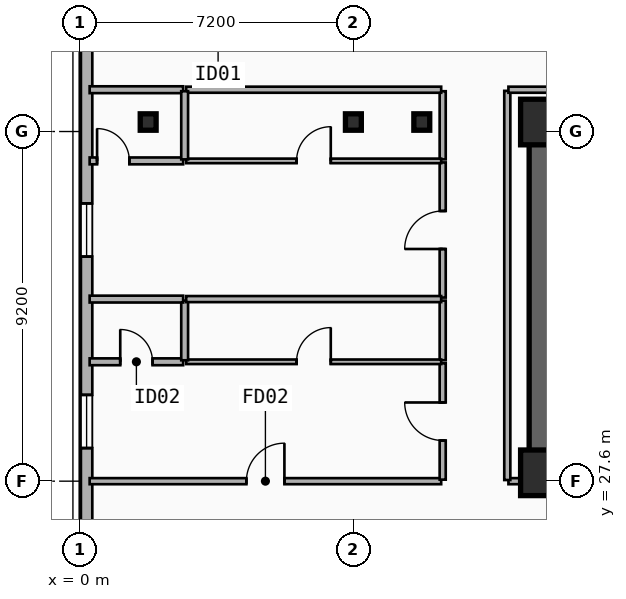
"""IFC4 building model, lengths in metres.
Left out: names, types, materials, properties, quantities, classifications, styles, units other than length and angle.
Written with IfcOpenShell. Run it as: python <this file> out.ifc"""

import sys

from ifc_helpers import new_model, si_unit, direction, frame, frame_2d, origin, origin_2d, place, context, subcontext, project, spatial, rectangle, i_section, extrude, element, fill, save


model = new_model("IFC4")
c1 = context("Model", 3, precision=1e-05, world=origin(), true_north=direction((0.0, 1.0)))
c2 = subcontext(c1, "Body", "Model", "MODEL_VIEW")
j1 = project(units=[si_unit("LENGTHUNIT", "METRE"), si_unit("PLANEANGLEUNIT", "RADIAN")], contexts=[c1])
p1 = place(None, origin())
s1 = spatial("IfcSite", under=j1, at=p1, CompositionType="ELEMENT")
p2 = place(p1, origin())
s2 = spatial("IfcBuilding", under=s1, at=p2, CompositionType="ELEMENT")
p3 = place(p2, frame((0.0, 0.0, 97.8)))
s3 = spatial("IfcBuildingStorey", under=s2, at=p3, CompositionType="ELEMENT", Elevation=97.8)
p4 = place(p3, frame((12.15, 37.05, 0.0), z_axis=(0.0, 0.0, 1.0), x_axis=(1.0, 0.0, 0.0)))
e1 = element("IfcWall", 1, at=p4, inside=s3, PredefinedType="SHEAR", context=c2, shape_type="SweptSolid", body=[
    extrude(rectangle(XDim=33.23, YDim=0.65, at=frame_2d((16.615, 0.0))), origin(), (0.0, 0.0, 1.0), 3.5),
])
p5 = place(p3, frame((21.18, 27.82, 0.0), z_axis=(0.0, 0.0, 1.0), x_axis=(-1.0, 0.0, 0.0)))
e2 = element("IfcWall", 2, at=p5, inside=s3, PredefinedType="SHEAR", context=c2, shape_type="SweptSolid", body=[
    extrude(rectangle(XDim=9.03, YDim=0.65, at=frame_2d((4.515, 0.0))), origin(), (0.0, 0.0, 1.0), 3.5),
])
p6 = place(p5, frame((2.68, 0.0, 0.0)))
e3 = element("IfcOpeningElement", 3, at=p6, cuts=e2, PredefinedType="OPENING", context=c2, shape_type="SweptSolid", body=[
    extrude(rectangle(XDim=1.1, YDim=2.15, at=frame_2d((0.55, 1.075))), frame((0.0, 0.335, 0.0), z_axis=(0.0, -1.0, 0.0), x_axis=(1.0, 0.0, 0.0)), (0.0, 0.0, 1.0), 0.67),
])
p7 = place(p3, frame((12.15, 28.145, 0.0), z_axis=(0.0, 0.0, 1.0), x_axis=(0.0, 1.0, 0.0)))
e4 = element("IfcWall", 4, at=p7, inside=s3, PredefinedType="SHEAR", context=c2, shape_type="SweptSolid", body=[
    extrude(rectangle(XDim=8.58, YDim=0.65, at=frame_2d((4.29, 0.0))), origin(), (0.0, 0.0, 1.0), 3.5),
])
for number, where, z_axis, x_axis in (
    (5, (12.2, 27.82, 0.0), (0.0, 0.0, 1.0), (1.0, 0.0, 0.0)),
    (6, (12.2, 37.05, 0.0), (0.0, 0.0, 1.0), (1.0, 0.0, 0.0)),
):
    element("IfcColumn", number, at=place(p3, frame(where, z_axis=z_axis, x_axis=x_axis)), inside=s3, PredefinedType="COLUMN", context=c2, shape_type="SweptSolid", body=[
        extrude(rectangle(XDim=1.2, YDim=1.2, at=origin_2d()), origin(), (0.0, 0.0, 1.0), 3.5),
    ])
for number, where, z_axis, x_axis in (
    (7, (9.0, 37.05, 0.0), (0.0, 0.0, 1.0), (1.0, 0.0, 0.0)),
    (8, (1.8, 37.05, 0.0), (0.0, 0.0, 1.0), (1.0, 0.0, 0.0)),
    (9, (7.2, 37.05, 0.0), (0.0, 0.0, 1.0), (1.0, 0.0, 0.0)),
):
    element("IfcColumn", number, at=place(p3, frame(where, z_axis=z_axis, x_axis=x_axis)), inside=s3, PredefinedType="COLUMN", context=c2, shape_type="SweptSolid", body=[
        extrude(i_section(OverallWidth=0.418, OverallDepth=0.432, WebThickness=0.035, FlangeThickness=0.056, FilletRadius=0.015, at=origin_2d()), origin(), (0.0, 0.0, 1.0), 3.5),
    ])
p8 = place(p3, frame((0.18, 21.0, 0.0), z_axis=(0.0, 0.0, 1.0), x_axis=(0.0, 1.0, 0.0)))
e10 = element("IfcWall", 10, at=p8, inside=s3, PredefinedType="SOLIDWALL", context=c2, shape_type="SweptSolid", body=[
    extrude(rectangle(XDim=18.0, YDim=0.3, at=frame_2d((9.0, 0.0))), origin(), (0.0, 0.0, 1.0), 3.24),
])
p9 = place(p8, frame((7.47, 0.0, 0.48)))
e11 = element("IfcOpeningElement", 11, at=p9, cuts=e10, PredefinedType="OPENING", context=c2, shape_type="SweptSolid", body=[
    extrude(rectangle(XDim=1.4, YDim=1.8, at=frame_2d((0.7, 0.9))), frame((0.0, 0.16, 0.0), z_axis=(0.0, -1.0, 0.0), x_axis=(1.0, 0.0, 0.0)), (0.0, 0.0, 1.0), 0.32),
])
p10 = place(p8, frame((12.509, 0.0, 0.48)))
e12 = element("IfcOpeningElement", 12, at=p10, cuts=e10, PredefinedType="OPENING", context=c2, shape_type="SweptSolid", body=[
    extrude(rectangle(XDim=1.4, YDim=1.8, at=frame_2d((0.7, 0.9))), frame((0.0, 0.16, 0.0), z_axis=(0.0, -1.0, 0.0), x_axis=(1.0, 0.0, 0.0)), (0.0, 0.0, 1.0), 0.32),
])
p11 = place(p8, frame((0.32, 0.0, 0.65)))
e13 = element("IfcOpeningElement", 13, at=p11, cuts=e10, PredefinedType="OPENING", context=c2, shape_type="SweptSolid", body=[
    extrude(rectangle(XDim=1.4, YDim=1.8, at=frame_2d((0.7, 0.9))), frame((0.0, 0.16, 0.0), z_axis=(0.0, -1.0, 0.0), x_axis=(1.0, 0.0, 0.0)), (0.0, 0.0, 1.0), 0.32),
])
p12 = place(p3, frame((0.26, 27.6, 0.0), z_axis=(0.0, 0.0, 1.0), x_axis=(1.0, 0.0, 0.0)))
e14 = element("IfcWall", 14, at=p12, inside=s3, PredefinedType="PARTITIONING", context=c2, shape_type="SweptSolid", body=[
    extrude(rectangle(XDim=9.25, YDim=0.16, at=frame_2d((4.625, 0.0))), origin(), (0.0, 0.0, 1.0), 2.57),
])
p13 = place(p12, frame((4.125, 0.0, 0.0)))
e15 = element("IfcOpeningElement", 15, at=p13, cuts=e14, PredefinedType="OPENING", context=c2, shape_type="SweptSolid", body=[
    extrude(rectangle(XDim=1.0, YDim=2.15, at=frame_2d((0.5, 1.075))), frame((0.0, 0.09, 0.0), z_axis=(0.0, -1.0, 0.0), x_axis=(1.0, 0.0, 0.0)), (0.0, 0.0, 1.0), 0.18),
])
p14 = place(p3, frame((9.55, 27.64, 0.0), z_axis=(0.0, 0.0, 1.0), x_axis=(0.0, 1.0, 0.0)))
e16 = element("IfcWall", 16, at=p14, inside=s3, PredefinedType="PARTITIONING", context=c2, shape_type="SweptSolid", body=[
    extrude(rectangle(XDim=3.061, YDim=0.16, at=frame_2d((1.531, 0.0))), origin(), (0.0, 0.0, 1.0), 3.24),
])
p15 = place(p14, frame((1.031, 0.0, 0.0)))
e17 = element("IfcOpeningElement", 17, at=p15, cuts=e16, PredefinedType="OPENING", context=c2, shape_type="SweptSolid", body=[
    extrude(rectangle(XDim=1.0, YDim=2.15, at=frame_2d((0.5, 1.075))), frame((0.0, 0.09, 0.0), z_axis=(0.0, -1.0, 0.0), x_axis=(1.0, 0.0, 0.0)), (0.0, 0.0, 1.0), 0.18),
])
p16 = place(p3, frame((9.55, 30.781, 0.0), z_axis=(0.0, 0.0, 1.0), x_axis=(0.0, 1.0, 0.0)))
e18 = element("IfcWall", 18, at=p16, inside=s3, PredefinedType="PARTITIONING", context=c2, shape_type="SweptSolid", body=[
    extrude(rectangle(XDim=1.57, YDim=0.16, at=frame_2d((0.785, 0.0))), origin(), (0.0, 0.0, 1.0), 3.24),
])
p17 = place(p3, frame((9.55, 32.431, 0.0), z_axis=(0.0, 0.0, 1.0), x_axis=(0.0, 1.0, 0.0)))
e19 = element("IfcWall", 19, at=p17, inside=s3, PredefinedType="PARTITIONING", context=c2, shape_type="SweptSolid", body=[
    extrude(rectangle(XDim=3.556, YDim=0.16, at=frame_2d((1.778, 0.0))), origin(), (0.0, 0.0, 1.0), 3.24),
])
p18 = place(p17, frame((1.278, 0.0, 0.0)))
e20 = element("IfcOpeningElement", 20, at=p18, cuts=e19, PredefinedType="OPENING", context=c2, shape_type="SweptSolid", body=[
    extrude(rectangle(XDim=1.0, YDim=2.15, at=frame_2d((0.5, 1.075))), frame((0.0, 0.09, 0.0), z_axis=(0.0, -1.0, 0.0), x_axis=(1.0, 0.0, 0.0)), (0.0, 0.0, 1.0), 0.18),
])
p19 = place(p3, frame((9.55, 36.067, 0.0), z_axis=(0.0, 0.0, 1.0), x_axis=(0.0, 1.0, 0.0)))
e21 = element("IfcWall", 21, at=p19, inside=s3, PredefinedType="PARTITIONING", context=c2, shape_type="SweptSolid", body=[
    extrude(rectangle(XDim=1.793, YDim=0.16, at=frame_2d((0.896, 0.0))), origin(), (0.0, 0.0, 1.0), 2.72),
])
p20 = place(p3, frame((0.26, 37.9, 0.0), z_axis=(0.0, 0.0, 1.0), x_axis=(1.0, 0.0, 0.0)))
e22 = element("IfcWall", 22, at=p20, inside=s3, PredefinedType="PLUMBINGWALL", context=c2, shape_type="SweptSolid", body=[
    extrude(rectangle(XDim=2.46, YDim=0.18, at=frame_2d((1.23, 0.0))), origin(), (0.0, 0.0, 1.0), 3.24),
])
p21 = place(p3, frame((2.8, 37.9, 0.0), z_axis=(0.0, 0.0, 1.0), x_axis=(1.0, 0.0, 0.0)))
e23 = element("IfcWall", 23, at=p21, inside=s3, PredefinedType="PARTITIONING", context=c2, shape_type="SweptSolid", body=[
    extrude(rectangle(XDim=6.71, YDim=0.16, at=frame_2d((3.355, 0.0))), origin(), (0.0, 0.0, 1.0), 3.24),
])
p22 = place(p3, frame((0.26, 30.741, 0.0), z_axis=(0.0, 0.0, 1.0), x_axis=(1.0, 0.0, 0.0)))
e24 = element("IfcWall", 24, at=p22, inside=s3, PredefinedType="PLUMBINGWALL", context=c2, shape_type="SweptSolid", body=[
    extrude(rectangle(XDim=2.46, YDim=0.18, at=frame_2d((1.23, 0.0))), origin(), (0.0, 0.0, 1.0), 2.57),
])
p23 = place(p22, frame((0.805, 0.0, 0.0)))
e25 = element("IfcOpeningElement", 25, at=p23, cuts=e24, PredefinedType="OPENING", context=c2, shape_type="SweptSolid", body=[
    extrude(rectangle(XDim=0.85, YDim=2.1, at=frame_2d((0.425, 1.05))), frame((0.0, 0.1, 0.0), z_axis=(0.0, -1.0, 0.0), x_axis=(1.0, 0.0, 0.0)), (0.0, 0.0, 1.0), 0.2),
])
p24 = place(p3, frame((2.8, 30.741, 0.0), z_axis=(0.0, 0.0, 1.0), x_axis=(1.0, 0.0, 0.0)))
e26 = element("IfcWall", 26, at=p24, inside=s3, PredefinedType="PARTITIONING", context=c2, shape_type="SweptSolid", body=[
    extrude(rectangle(XDim=6.71, YDim=0.12, at=frame_2d((3.355, 0.0))), origin(), (0.0, 0.0, 1.0), 2.57),
])
p25 = place(p24, frame((2.905, 0.0, 0.0)))
e27 = element("IfcOpeningElement", 27, at=p25, cuts=e26, PredefinedType="OPENING", context=c2, shape_type="SweptSolid", body=[
    extrude(rectangle(XDim=0.9, YDim=2.1, at=frame_2d((0.45, 1.05))), frame((0.0, 0.07, 0.0), z_axis=(0.0, -1.0, 0.0), x_axis=(1.0, 0.0, 0.0)), (0.0, 0.0, 1.0), 0.14),
])
p26 = place(p3, frame((2.76, 30.781, 0.0), z_axis=(0.0, 0.0, 1.0), x_axis=(0.0, 1.0, 0.0)))
e28 = element("IfcWall", 28, at=p26, inside=s3, PredefinedType="PLUMBINGWALL", context=c2, shape_type="SweptSolid", body=[
    extrude(rectangle(XDim=1.57, YDim=0.18, at=frame_2d((0.785, 0.0))), origin(), (0.0, 0.0, 1.0), 3.24),
])
p27 = place(p3, frame((0.26, 32.391, 0.0), z_axis=(0.0, 0.0, 1.0), x_axis=(1.0, 0.0, 0.0)))
e29 = element("IfcWall", 29, at=p27, inside=s3, PredefinedType="PLUMBINGWALL", context=c2, shape_type="SweptSolid", body=[
    extrude(rectangle(XDim=2.46, YDim=0.18, at=frame_2d((1.23, 0.0))), origin(), (0.0, 0.0, 1.0), 2.57),
])
p28 = place(p3, frame((2.8, 32.391, 0.0), z_axis=(0.0, 0.0, 1.0), x_axis=(1.0, 0.0, 0.0)))
e30 = element("IfcWall", 30, at=p28, inside=s3, PredefinedType="PARTITIONING", context=c2, shape_type="SweptSolid", body=[
    extrude(rectangle(XDim=6.71, YDim=0.16, at=frame_2d((3.355, 0.0))), origin(), (0.0, 0.0, 1.0), 2.57),
])
p29 = place(p3, frame((0.26, 36.027, 0.0), z_axis=(0.0, 0.0, 1.0), x_axis=(1.0, 0.0, 0.0)))
e31 = element("IfcWall", 31, at=p29, inside=s3, PredefinedType="PLUMBINGWALL", context=c2, shape_type="SweptSolid", body=[
    extrude(rectangle(XDim=2.46, YDim=0.18, at=frame_2d((1.23, 0.0))), origin(), (0.0, 0.0, 1.0), 2.57),
])
p30 = place(p29, frame((0.195, 0.0, 0.0)))
e32 = element("IfcOpeningElement", 32, at=p30, cuts=e31, PredefinedType="OPENING", context=c2, shape_type="SweptSolid", body=[
    extrude(rectangle(XDim=0.85, YDim=2.1, at=frame_2d((0.425, 1.05))), frame((0.0, 0.1, 0.0), z_axis=(0.0, -1.0, 0.0), x_axis=(1.0, 0.0, 0.0)), (0.0, 0.0, 1.0), 0.2),
])
p31 = place(p3, frame((2.8, 36.027, 0.0), z_axis=(0.0, 0.0, 1.0), x_axis=(1.0, 0.0, 0.0)))
e33 = element("IfcWall", 33, at=p31, inside=s3, PredefinedType="PARTITIONING", context=c2, shape_type="SweptSolid", body=[
    extrude(rectangle(XDim=6.71, YDim=0.12, at=frame_2d((3.355, 0.0))), origin(), (0.0, 0.0, 1.0), 2.57),
])
p32 = place(p31, frame((2.905, 0.0, 0.0)))
e34 = element("IfcOpeningElement", 34, at=p32, cuts=e33, PredefinedType="OPENING", context=c2, shape_type="SweptSolid", body=[
    extrude(rectangle(XDim=0.9, YDim=2.1, at=frame_2d((0.45, 1.05))), frame((0.0, 0.07, 0.0), z_axis=(0.0, -1.0, 0.0), x_axis=(1.0, 0.0, 0.0)), (0.0, 0.0, 1.0), 0.14),
])
p33 = place(p3, frame((2.76, 36.067, 0.0), z_axis=(0.0, 0.0, 1.0), x_axis=(0.0, 1.0, 0.0)))
e35 = element("IfcWall", 35, at=p33, inside=s3, PredefinedType="PLUMBINGWALL", context=c2, shape_type="SweptSolid", body=[
    extrude(rectangle(XDim=1.793, YDim=0.18, at=frame_2d((0.896, 0.0))), origin(), (0.0, 0.0, 1.0), 2.72),
])
p34 = place(p3, frame((11.28, 27.6, 0.0), z_axis=(0.0, 0.0, 1.0), x_axis=(1.0, 0.0, 0.0)))
e36 = element("IfcWall", 36, at=p34, inside=s3, PredefinedType="PARTITIONING", context=c2, shape_type="SweptSolid", body=[
    extrude(rectangle(XDim=0.84, YDim=0.16, at=frame_2d((0.42, 0.0))), origin(), (0.0, 0.0, 1.0), 2.28),
])
p35 = place(p3, frame((11.25, 27.63, 0.0), z_axis=(0.0, 0.0, 1.0), x_axis=(0.0, 1.0, 0.0)))
e37 = element("IfcWall", 37, at=p35, inside=s3, PredefinedType="PARTITIONING", context=c2, shape_type="SweptSolid", body=[
    extrude(rectangle(XDim=10.24, YDim=0.16, at=frame_2d((5.12, 0.0))), origin(), (0.0, 0.0, 1.0), 2.72),
])
p36 = place(p3, frame((11.28, 37.9, 0.0), z_axis=(0.0, 0.0, 1.0), x_axis=(1.0, 0.0, 0.0)))
e38 = element("IfcWall", 38, at=p36, inside=s3, PredefinedType="PARTITIONING", context=c2, shape_type="SweptSolid", body=[
    extrude(rectangle(XDim=35.04, YDim=0.16, at=frame_2d((17.52, 0.0))), origin(), (0.0, 0.0, 1.0), 3.24),
])
p37 = place(p9, origin())
e39 = element("IfcWindow", 39, at=p37, inside=s3, PartitioningType="SINGLE_PANEL", PredefinedType="WINDOW", context=c2, shape_type="SweptSolid", body=[
    extrude(rectangle(XDim=1.4, YDim=1.8, at=frame_2d((0.7, 0.9))), frame((0.0, 0.03, 0.0), z_axis=(0.0, -1.0, 0.0), x_axis=(1.0, 0.0, 0.0)), (0.0, 0.0, 1.0), 0.06),
])
fill(e11, e39)
p38 = place(p10, origin())
e40 = element("IfcWindow", 40, at=p38, inside=s3, PartitioningType="SINGLE_PANEL", PredefinedType="WINDOW", context=c2, shape_type="SweptSolid", body=[
    extrude(rectangle(XDim=1.4, YDim=1.8, at=frame_2d((0.7, 0.9))), frame((0.0, 0.03, 0.0), z_axis=(0.0, -1.0, 0.0), x_axis=(1.0, 0.0, 0.0)), (0.0, 0.0, 1.0), 0.06),
])
fill(e12, e40)
p39 = place(p13, origin())
e41 = element("IfcDoor", 41, at=p39, inside=s3, OperationType="SINGLE_SWING_RIGHT", PredefinedType="DOOR", context=c2, shape_type="SweptSolid", body=[
    extrude(rectangle(XDim=1.0, YDim=2.15, at=frame_2d((0.5, 1.075))), frame((0.0, 0.025, 0.0), z_axis=(0.0, -1.0, 0.0), x_axis=(1.0, 0.0, 0.0)), (0.0, 0.0, 1.0), 0.05),
])
fill(e15, e41)
p40 = place(p15, origin())
e42 = element("IfcDoor", 42, at=p40, inside=s3, OperationType="SINGLE_SWING_RIGHT", PredefinedType="DOOR", context=c2, shape_type="SweptSolid", body=[
    extrude(rectangle(XDim=1.0, YDim=2.15, at=frame_2d((0.5, 1.075))), frame((0.0, 0.025, 0.0), z_axis=(0.0, -1.0, 0.0), x_axis=(1.0, 0.0, 0.0)), (0.0, 0.0, 1.0), 0.05),
])
fill(e17, e42)
p41 = place(p18, origin())
e43 = element("IfcDoor", 43, at=p41, inside=s3, OperationType="SINGLE_SWING_LEFT", PredefinedType="DOOR", context=c2, shape_type="SweptSolid", body=[
    extrude(rectangle(XDim=1.0, YDim=2.15, at=frame_2d((0.5, 1.075))), frame((0.0, 0.025, 0.0), z_axis=(0.0, -1.0, 0.0), x_axis=(1.0, 0.0, 0.0)), (0.0, 0.0, 1.0), 0.05),
])
fill(e20, e43)
p42 = place(p23, origin())
e44 = element("IfcDoor", 44, at=p42, inside=s3, OperationType="SINGLE_SWING_LEFT", PredefinedType="DOOR", context=c2, shape_type="SweptSolid", body=[
    extrude(rectangle(XDim=0.85, YDim=2.1, at=frame_2d((0.425, 1.05))), frame((0.0, 0.025, 0.0), z_axis=(0.0, -1.0, 0.0), x_axis=(1.0, 0.0, 0.0)), (0.0, 0.0, 1.0), 0.05),
])
fill(e25, e44)
p43 = place(p25, origin())
e45 = element("IfcDoor", 45, at=p43, inside=s3, OperationType="SINGLE_SWING_RIGHT", PredefinedType="DOOR", context=c2, shape_type="SweptSolid", body=[
    extrude(rectangle(XDim=0.9, YDim=2.1, at=frame_2d((0.45, 1.05))), frame((0.0, 0.025, 0.0), z_axis=(0.0, -1.0, 0.0), x_axis=(1.0, 0.0, 0.0)), (0.0, 0.0, 1.0), 0.05),
])
fill(e27, e45)
p44 = place(p30, origin())
e46 = element("IfcDoor", 46, at=p44, inside=s3, OperationType="SINGLE_SWING_LEFT", PredefinedType="DOOR", context=c2, shape_type="SweptSolid", body=[
    extrude(rectangle(XDim=0.85, YDim=2.1, at=frame_2d((0.425, 1.05))), frame((0.0, 0.025, 0.0), z_axis=(0.0, -1.0, 0.0), x_axis=(1.0, 0.0, 0.0)), (0.0, 0.0, 1.0), 0.05),
])
fill(e32, e46)
p45 = place(p32, origin())
e47 = element("IfcDoor", 47, at=p45, inside=s3, OperationType="SINGLE_SWING_RIGHT", PredefinedType="DOOR", context=c2, shape_type="SweptSolid", body=[
    extrude(rectangle(XDim=0.9, YDim=2.1, at=frame_2d((0.45, 1.05))), frame((0.0, 0.025, 0.0), z_axis=(0.0, -1.0, 0.0), x_axis=(1.0, 0.0, 0.0)), (0.0, 0.0, 1.0), 0.05),
])
fill(e34, e47)
save(model, sys.argv[1])
